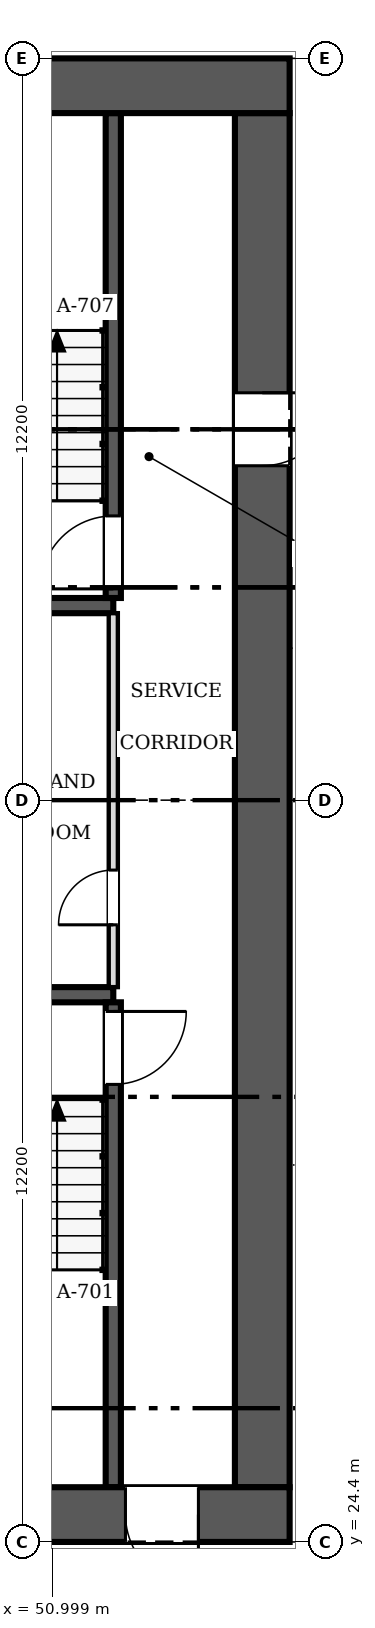
"""IFC4 building model, lengths in metres.
Left out: names, types, materials, properties, quantities, classifications, styles, units other than length and angle.
Written with IfcOpenShell. Run it as: python <this file> out.ifc"""

import sys

from ifc_helpers import new_model, si_unit, direction, frame, frame_2d, origin, place, context, subcontext, project, spatial, rectangle, extrude, source, transform, mapped, element, fill, save


model = new_model("IFC4")
c1 = context("Model", 3, precision=1e-05, world=origin(), true_north=direction((0.0, 1.0)))
c2 = subcontext(c1, "Body", "Model", "MODEL_VIEW")
j1 = project(units=[si_unit("LENGTHUNIT", "METRE"), si_unit("PLANEANGLEUNIT", "RADIAN")], contexts=[c1])
p1 = place(None, origin())
s1 = spatial("IfcSite", under=j1, at=p1, CompositionType="ELEMENT")
p2 = place(p1, origin())
s2 = spatial("IfcBuilding", under=s1, at=p2, CompositionType="ELEMENT")
p3 = place(p2, frame((0.0, 0.0, 60.0)))
s3 = spatial("IfcBuildingStorey", under=s2, at=p3, CompositionType="ELEMENT", Elevation=60.0)
p4 = place(p3, frame((54.9, 24.85, 0.0), z_axis=(0.0, 0.0, 1.0), x_axis=(-1.0, 0.0, 0.0)))
e1 = element("IfcWall", 1, at=p4, inside=s3, PredefinedType="SHEAR", context=c2, shape_type="SweptSolid", body=[
    extrude(rectangle(XDim=24.4, YDim=0.9, at=frame_2d((12.2, 0.0))), origin(), (0.0, 0.0, 1.0), 3.8),
])
m1 = source(origin(), c2, "Body", "SweptSolid", [
    extrude(rectangle(XDim=1.2, YDim=2.1, at=frame_2d((0.6, 1.05))), frame((0.0, 0.46, 0.0), z_axis=(0.0, -1.0, 0.0), x_axis=(1.0, 0.0, 0.0)), (0.0, 0.0, 1.0), 0.92),
])
p5 = place(p4, frame((1.5, 0.0, 0.0)))
e2 = element("IfcOpeningElement", 2, at=p5, cuts=e1, PredefinedType="OPENING", context=c2, shape_type="MappedRepresentation", body=[
    mapped(m1, transform((0.0, 0.0, 0.0), scale=1.0)),
])
p6 = place(p3, frame((30.5, 48.35, 0.0), z_axis=(0.0, 0.0, 1.0), x_axis=(1.0, 0.0, 0.0)))
e3 = element("IfcWall", 3, at=p6, inside=s3, PredefinedType="SHEAR", context=c2, shape_type="SweptSolid", body=[
    extrude(rectangle(XDim=24.4, YDim=0.9, at=frame_2d((12.2, 0.0))), origin(), (0.0, 0.0, 1.0), 3.8),
])
p7 = place(p3, frame((54.45, 47.9, 0.0), z_axis=(0.0, 0.0, 1.0), x_axis=(0.0, -1.0, 0.0)))
e4 = element("IfcWall", 4, at=p7, inside=s3, PredefinedType="SHEAR", context=c2, shape_type="SweptSolid", body=[
    extrude(rectangle(XDim=22.6, YDim=0.9, at=frame_2d((11.3, 0.0))), origin(), (0.0, 0.0, 1.0), 3.8),
])
p8 = place(p7, frame((4.6, 0.0, 0.0)))
e5 = element("IfcOpeningElement", 5, at=p8, cuts=e4, PredefinedType="OPENING", context=c2, shape_type="MappedRepresentation", body=[
    mapped(m1, transform((0.0, 0.0, 0.0), scale=1.0)),
])
for number, where, z_axis, x_axis in (
    (6, (48.475, 33.4, 0.0), (0.0, 0.0, 1.0), (1.0, 0.0, 0.0)),
    (7, (48.475, 39.8, 0.0), (0.0, 0.0, 1.0), (1.0, 0.0, 0.0)),
):
    element("IfcWall", number, at=place(p3, frame(where, z_axis=z_axis, x_axis=x_axis)), inside=s3, PredefinedType="SOLIDWALL", context=c2, shape_type="SweptSolid", body=[
        extrude(rectangle(XDim=3.525, YDim=0.25, at=frame_2d((1.762, 0.0))), origin(), (0.0, 0.0, 1.0), 3.8),
    ])
p9 = place(p3, frame((52.0, 25.3, 0.0), z_axis=(0.0, 0.0, 1.0), x_axis=(0.0, 1.0, 0.0)))
e8 = element("IfcWall", 8, at=p9, inside=s3, PredefinedType="SOLIDWALL", context=c2, shape_type="SweptSolid", body=[
    extrude(rectangle(XDim=7.975, YDim=0.25, at=frame_2d((3.987, 0.0))), origin(), (0.0, 0.0, 1.0), 3.8),
])
m2 = source(origin(), c2, "Body", "SweptSolid", [
    extrude(rectangle(XDim=1.2, YDim=2.1, at=frame_2d((0.6, 1.05))), frame((0.0, 0.135, 0.0), z_axis=(0.0, -1.0, 0.0), x_axis=(1.0, 0.0, 0.0)), (0.0, 0.0, 1.0), 0.27),
])
p10 = place(p9, frame((6.625, 0.0, 0.0)))
e9 = element("IfcOpeningElement", 9, at=p10, cuts=e8, PredefinedType="OPENING", context=c2, shape_type="MappedRepresentation", body=[
    mapped(m2, transform((0.0, 0.0, 0.0), scale=1.0)),
])
p11 = place(p3, frame((52.0, 39.925, 0.0), z_axis=(0.0, 0.0, 1.0), x_axis=(0.0, 1.0, 0.0)))
e10 = element("IfcWall", 10, at=p11, inside=s3, PredefinedType="SOLIDWALL", context=c2, shape_type="SweptSolid", body=[
    extrude(rectangle(XDim=7.975, YDim=0.25, at=frame_2d((3.987, 0.0))), origin(), (0.0, 0.0, 1.0), 3.8),
])
p12 = place(p11, frame((0.15, 0.0, 0.0)))
e11 = element("IfcOpeningElement", 11, at=p12, cuts=e10, PredefinedType="OPENING", context=c2, shape_type="MappedRepresentation", body=[
    mapped(m2, transform((0.0, 0.0, 0.0), scale=1.0)),
])
p13 = place(p3, frame((52.0, 33.525, 0.0), z_axis=(0.0, 0.0, 1.0), x_axis=(0.0, 1.0, 0.0)))
e12 = element("IfcWall", 12, at=p13, inside=s3, PredefinedType="PARTITIONING", context=c2, shape_type="SweptSolid", body=[
    extrude(rectangle(XDim=6.15, YDim=0.15, at=frame_2d((3.075, 0.0))), origin(), (0.0, 0.0, 1.0), 3.5),
])
m3 = source(origin(), c2, "Body", "SweptSolid", [
    extrude(rectangle(XDim=0.9, YDim=2.1, at=frame_2d((0.45, 1.05))), frame((0.0, 0.085, 0.0), z_axis=(0.0, -1.0, 0.0), x_axis=(1.0, 0.0, 0.0)), (0.0, 0.0, 1.0), 0.17),
])
p14 = place(p13, frame((1.025, 0.0, 0.0)))
e13 = element("IfcOpeningElement", 13, at=p14, cuts=e12, PredefinedType="OPENING", context=c2, shape_type="MappedRepresentation", body=[
    mapped(m3, transform((0.0, 0.0, 0.0), scale=1.0)),
])
m4 = source(origin(), c2, "Body", "SweptSolid", [
    extrude(rectangle(XDim=1.2, YDim=2.1, at=frame_2d((0.6, 1.05))), frame((0.0, 0.025, 0.0), z_axis=(0.0, -1.0, 0.0), x_axis=(1.0, 0.0, 0.0)), (0.0, 0.0, 1.0), 0.05),
])
p15 = place(p5, origin())
e14 = element("IfcDoor", 14, at=p15, inside=s3, OperationType="SINGLE_SWING_LEFT", PredefinedType="DOOR", context=c2, shape_type="MappedRepresentation", body=[
    mapped(m4, transform((0.0, 0.0, 0.0), scale=1.0)),
])
fill(e2, e14)
p16 = place(p8, origin())
e15 = element("IfcDoor", 15, at=p16, inside=s3, OperationType="SINGLE_SWING_LEFT", PredefinedType="DOOR", context=c2, shape_type="MappedRepresentation", body=[
    mapped(m4, transform((0.0, 0.0, 0.0), scale=1.0)),
])
fill(e5, e15)
p17 = place(p10, origin())
e16 = element("IfcDoor", 16, at=p17, inside=s3, OperationType="SINGLE_SWING_RIGHT", PredefinedType="DOOR", context=c2, shape_type="MappedRepresentation", body=[
    mapped(m4, transform((0.0, 0.0, 0.0), scale=1.0)),
])
fill(e9, e16)
p18 = place(p12, origin())
e17 = element("IfcDoor", 17, at=p18, inside=s3, OperationType="SINGLE_SWING_LEFT", PredefinedType="DOOR", context=c2, shape_type="MappedRepresentation", body=[
    mapped(m4, transform((0.0, 0.0, 0.0), scale=1.0)),
])
fill(e11, e17)
m5 = source(origin(), c2, "Body", "SweptSolid", [
    extrude(rectangle(XDim=0.9, YDim=2.1, at=frame_2d((0.45, 1.05))), frame((0.0, 0.025, 0.0), z_axis=(0.0, -1.0, 0.0), x_axis=(1.0, 0.0, 0.0)), (0.0, 0.0, 1.0), 0.05),
])
p19 = place(p14, origin())
e18 = element("IfcDoor", 18, at=p19, inside=s3, OperationType="SINGLE_SWING_LEFT", PredefinedType="DOOR", context=c2, shape_type="MappedRepresentation", body=[
    mapped(m5, transform((0.0, 0.0, 0.0), scale=1.0)),
])
fill(e13, e18)
save(model, sys.argv[1])
